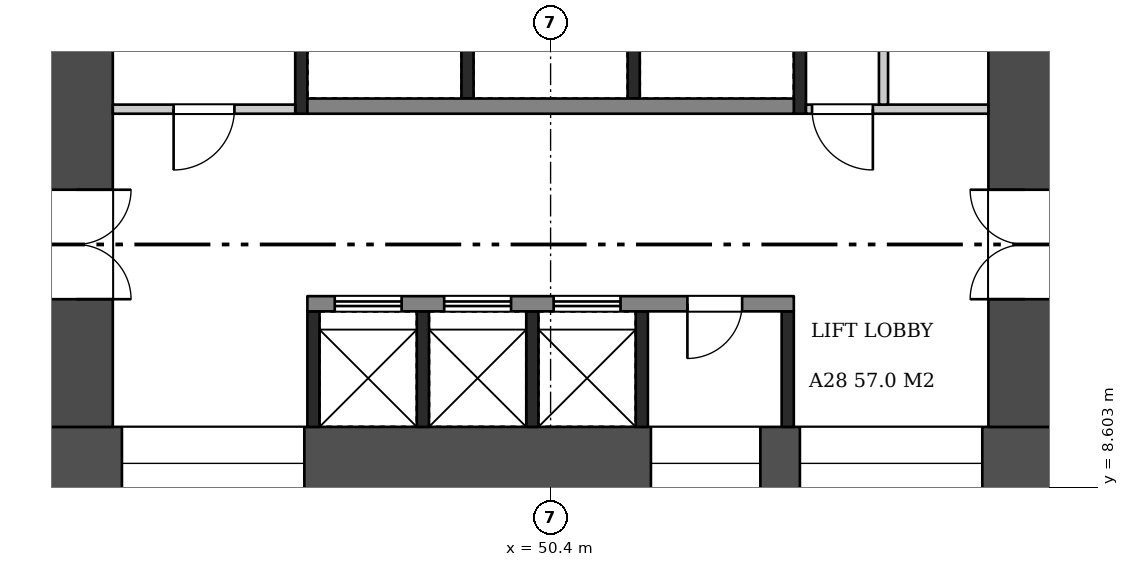
"""IFC4 building model, lengths in metres.
Left out: names, types, materials, properties, quantities, classifications, styles, units other than length and angle.
Written with IfcOpenShell. Run it as: python <this file> out.ifc"""

import sys

from ifc_helpers import new_model, si_unit, direction, frame, frame_2d, origin, place, context, subcontext, project, spatial, rectangle, extrude, element, fill, save


model = new_model("IFC4")
c1 = context("Model", 3, precision=1e-05, world=origin(), true_north=direction((0.0, 1.0)))
c2 = subcontext(c1, "Body", "Model", "MODEL_VIEW")
j1 = project(units=[si_unit("LENGTHUNIT", "METRE"), si_unit("PLANEANGLEUNIT", "RADIAN")], contexts=[c1])
p1 = place(None, origin())
s1 = spatial("IfcSite", under=j1, at=p1, CompositionType="ELEMENT")
p2 = place(p1, origin())
s2 = spatial("IfcBuilding", under=s1, at=p2, CompositionType="ELEMENT")
p3 = place(p2, frame((0.0, 0.0, 112.7)))
s3 = spatial("IfcBuildingStorey", under=s2, at=p3, CompositionType="ELEMENT", Elevation=112.7)
p4 = place(p3, frame((42.0, 9.0, 0.0), z_axis=(0.0, 0.0, 1.0), x_axis=(1.0, 0.0, 0.0)))
e1 = element("IfcWall", 1, at=p4, inside=s3, PredefinedType="SHEAR", context=c2, shape_type="SweptSolid", body=[
    extrude(rectangle(XDim=16.8, YDim=1.2, at=frame_2d((8.4, 0.0))), origin(), (0.0, 0.0, 1.0), 3.22),
])
p5 = place(p4, frame((1.35, 0.0, 0.6)))
e2 = element("IfcOpeningElement", 2, at=p5, cuts=e1, PredefinedType="OPENING", context=c2, shape_type="SweptSolid", body=[
    extrude(rectangle(XDim=3.0, YDim=2.1, at=frame_2d((1.5, 1.05))), frame((0.0, 0.61, 0.0), z_axis=(0.0, -1.0, 0.0), x_axis=(1.0, 0.0, 0.0)), (0.0, 0.0, 1.0), 1.22),
])
p6 = place(p4, frame((10.05, 0.0, 1.6)))
e3 = element("IfcOpeningElement", 3, at=p6, cuts=e1, PredefinedType="OPENING", context=c2, shape_type="SweptSolid", body=[
    extrude(rectangle(XDim=1.8, YDim=1.2, at=frame_2d((0.9, 0.6))), frame((0.0, 0.61, 0.0), z_axis=(0.0, -1.0, 0.0), x_axis=(1.0, 0.0, 0.0)), (0.0, 0.0, 1.0), 1.22),
])
p7 = place(p4, frame((12.5, 0.0, 0.6)))
e4 = element("IfcOpeningElement", 4, at=p7, cuts=e1, PredefinedType="OPENING", context=c2, shape_type="SweptSolid", body=[
    extrude(rectangle(XDim=3.0, YDim=2.1, at=frame_2d((1.5, 1.05))), frame((0.0, 0.61, 0.0), z_axis=(0.0, -1.0, 0.0), x_axis=(1.0, 0.0, 0.0)), (0.0, 0.0, 1.0), 1.22),
])
p8 = place(p3, frame((42.6, 9.6, 0.0), z_axis=(0.0, 0.0, 1.0), x_axis=(0.0, 1.0, 0.0)))
e5 = element("IfcWall", 5, at=p8, inside=s3, PredefinedType="SHEAR", context=c2, shape_type="SweptSolid", body=[
    extrude(rectangle(XDim=14.4, YDim=1.2, at=frame_2d((7.2, 0.0))), origin(), (0.0, 0.0, 1.0), 3.22),
])
p9 = place(p8, frame((2.1, 0.0, 0.0)))
e6 = element("IfcOpeningElement", 6, at=p9, cuts=e5, PredefinedType="OPENING", context=c2, shape_type="SweptSolid", body=[
    extrude(rectangle(XDim=1.8, YDim=2.1, at=frame_2d((0.9, 1.05))), frame((0.0, 0.61, 0.0), z_axis=(0.0, -1.0, 0.0), x_axis=(1.0, 0.0, 0.0)), (0.0, 0.0, 1.0), 1.22),
])
p10 = place(p3, frame((58.2, 9.6, 0.0), z_axis=(0.0, 0.0, 1.0), x_axis=(0.0, 1.0, 0.0)))
e7 = element("IfcWall", 7, at=p10, inside=s3, PredefinedType="SHEAR", context=c2, shape_type="SweptSolid", body=[
    extrude(rectangle(XDim=14.4, YDim=1.2, at=frame_2d((7.2, 0.0))), origin(), (0.0, 0.0, 1.0), 3.22),
])
p11 = place(p10, frame((2.1, 0.0, 0.0)))
e8 = element("IfcOpeningElement", 8, at=p11, cuts=e7, PredefinedType="OPENING", context=c2, shape_type="SweptSolid", body=[
    extrude(rectangle(XDim=1.8, YDim=2.1, at=frame_2d((0.9, 1.05))), frame((0.0, 0.61, 0.0), z_axis=(0.0, -1.0, 0.0), x_axis=(1.0, 0.0, 0.0)), (0.0, 0.0, 1.0), 1.22),
])
for number, where, z_axis, x_axis in (
    (9, (46.5, 9.6, 0.0), (0.0, 0.0, 1.0), (0.0, 1.0, 0.0)),
    (10, (48.3, 9.6, 0.0), (0.0, 0.0, 1.0), (0.0, 1.0, 0.0)),
    (11, (50.1, 9.6, 0.0), (0.0, 0.0, 1.0), (0.0, 1.0, 0.0)),
    (12, (51.9, 9.6, 0.0), (0.0, 0.0, 1.0), (0.0, 1.0, 0.0)),
    (13, (54.3, 9.6, 0.0), (0.0, 0.0, 1.0), (0.0, 1.0, 0.0)),
):
    element("IfcWall", number, at=place(p3, frame(where, z_axis=z_axis, x_axis=x_axis)), inside=s3, PredefinedType="SHEAR", context=c2, shape_type="SweptSolid", body=[
        extrude(rectangle(XDim=1.9, YDim=0.2, at=frame_2d((0.95, 0.0))), origin(), (0.0, 0.0, 1.0), 3.22),
    ])
p12 = place(p3, frame((46.4, 11.625, 0.0), z_axis=(0.0, 0.0, 1.0), x_axis=(1.0, 0.0, 0.0)))
e14 = element("IfcWall", 14, at=p12, inside=s3, PredefinedType="SHEAR", context=c2, shape_type="SweptSolid", body=[
    extrude(rectangle(XDim=8.0, YDim=0.25, at=frame_2d((4.0, 0.0))), origin(), (0.0, 0.0, 1.0), 3.22),
])
p13 = place(p12, frame((0.45, 0.0, 0.0)))
e15 = element("IfcOpeningElement", 15, at=p13, cuts=e14, PredefinedType="OPENING", context=c2, shape_type="SweptSolid", body=[
    extrude(rectangle(XDim=1.1, YDim=2.1, at=frame_2d((0.55, 1.05))), frame((0.0, 0.135, 0.0), z_axis=(0.0, -1.0, 0.0), x_axis=(1.0, 0.0, 0.0)), (0.0, 0.0, 1.0), 0.27),
])
p14 = place(p12, frame((2.25, 0.0, 0.0)))
e16 = element("IfcOpeningElement", 16, at=p14, cuts=e14, PredefinedType="OPENING", context=c2, shape_type="SweptSolid", body=[
    extrude(rectangle(XDim=1.1, YDim=2.1, at=frame_2d((0.55, 1.05))), frame((0.0, 0.135, 0.0), z_axis=(0.0, -1.0, 0.0), x_axis=(1.0, 0.0, 0.0)), (0.0, 0.0, 1.0), 0.27),
])
p15 = place(p12, frame((4.05, 0.0, 0.0)))
e17 = element("IfcOpeningElement", 17, at=p15, cuts=e14, PredefinedType="OPENING", context=c2, shape_type="SweptSolid", body=[
    extrude(rectangle(XDim=1.1, YDim=2.1, at=frame_2d((0.55, 1.05))), frame((0.0, 0.135, 0.0), z_axis=(0.0, -1.0, 0.0), x_axis=(1.0, 0.0, 0.0)), (0.0, 0.0, 1.0), 0.27),
])
p16 = place(p12, frame((6.25, 0.0, 0.0)))
e18 = element("IfcOpeningElement", 18, at=p16, cuts=e14, PredefinedType="OPENING", context=c2, shape_type="SweptSolid", body=[
    extrude(rectangle(XDim=0.9, YDim=2.1, at=frame_2d((0.45, 1.05))), frame((0.0, 0.135, 0.0), z_axis=(0.0, -1.0, 0.0), x_axis=(1.0, 0.0, 0.0)), (0.0, 0.0, 1.0), 0.27),
])
for number, where, z_axis, x_axis in (
    (19, (49.033, 15.0, 0.0), (0.0, 0.0, 1.0), (0.0, 1.0, 0.0)),
    (20, (51.767, 15.0, 0.0), (0.0, 0.0, 1.0), (0.0, 1.0, 0.0)),
):
    element("IfcWall", number, at=place(p3, frame(where, z_axis=z_axis, x_axis=x_axis)), inside=s3, PredefinedType="SHEAR", context=c2, shape_type="SweptSolid", body=[
        extrude(rectangle(XDim=1.9, YDim=0.2, at=frame_2d((0.95, 0.0))), origin(), (0.0, 0.0, 1.0), 3.22),
    ])
p17 = place(p3, frame((46.4, 14.875, 0.0), z_axis=(0.0, 0.0, 1.0), x_axis=(1.0, 0.0, 0.0)))
e21 = element("IfcWall", 21, at=p17, inside=s3, PredefinedType="SHEAR", context=c2, shape_type="SweptSolid", body=[
    extrude(rectangle(XDim=8.0, YDim=0.25, at=frame_2d((4.0, 0.0))), origin(), (0.0, 0.0, 1.0), 3.22),
])
p18 = place(p3, frame((46.3, 14.75, 0.0), z_axis=(0.0, 0.0, 1.0), x_axis=(0.0, 1.0, 0.0)))
e22 = element("IfcWall", 22, at=p18, inside=s3, PredefinedType="SHEAR", context=c2, shape_type="SweptSolid", body=[
    extrude(rectangle(XDim=2.4, YDim=0.2, at=frame_2d((1.2, 0.0))), origin(), (0.0, 0.0, 1.0), 3.22),
])
p19 = place(p3, frame((43.2, 14.825, 0.0), z_axis=(0.0, 0.0, 1.0), x_axis=(1.0, 0.0, 0.0)))
e23 = element("IfcWall", 23, at=p19, inside=s3, PredefinedType="PARTITIONING", context=c2, shape_type="SweptSolid", body=[
    extrude(rectangle(XDim=3.0, YDim=0.15, at=frame_2d((1.5, 0.0))), origin(), (0.0, 0.0, 1.0), 3.22),
])
p20 = place(p19, frame((1.0, 0.0, 0.0)))
e24 = element("IfcOpeningElement", 24, at=p20, cuts=e23, PredefinedType="OPENING", context=c2, shape_type="SweptSolid", body=[
    extrude(rectangle(XDim=1.0, YDim=2.1, at=frame_2d((0.5, 1.05))), frame((0.0, 0.085, 0.0), z_axis=(0.0, -1.0, 0.0), x_axis=(1.0, 0.0, 0.0)), (0.0, 0.0, 1.0), 0.17),
])
p21 = place(p3, frame((54.5, 14.75, 0.0), z_axis=(0.0, 0.0, 1.0), x_axis=(0.0, 1.0, 0.0)))
e25 = element("IfcWall", 25, at=p21, inside=s3, PredefinedType="SHEAR", context=c2, shape_type="SweptSolid", body=[
    extrude(rectangle(XDim=9.25, YDim=0.2, at=frame_2d((4.625, 0.0))), origin(), (0.0, 0.0, 1.0), 3.22),
])
p22 = place(p3, frame((54.6, 14.825, 0.0), z_axis=(0.0, 0.0, 1.0), x_axis=(1.0, 0.0, 0.0)))
e26 = element("IfcWall", 26, at=p22, inside=s3, PredefinedType="PARTITIONING", context=c2, shape_type="SweptSolid", body=[
    extrude(rectangle(XDim=3.0, YDim=0.15, at=frame_2d((1.5, 0.0))), origin(), (0.0, 0.0, 1.0), 3.22),
])
p23 = place(p22, frame((0.1, 0.0, 0.0)))
e27 = element("IfcOpeningElement", 27, at=p23, cuts=e26, PredefinedType="OPENING", context=c2, shape_type="SweptSolid", body=[
    extrude(rectangle(XDim=1.0, YDim=2.1, at=frame_2d((0.5, 1.05))), frame((0.0, 0.085, 0.0), z_axis=(0.0, -1.0, 0.0), x_axis=(1.0, 0.0, 0.0)), (0.0, 0.0, 1.0), 0.17),
])
p24 = place(p3, frame((55.875, 14.9, 0.0), z_axis=(0.0, 0.0, 1.0), x_axis=(0.0, 1.0, 0.0)))
e28 = element("IfcWall", 28, at=p24, inside=s3, PredefinedType="PARTITIONING", context=c2, shape_type="SweptSolid", body=[
    extrude(rectangle(XDim=9.1, YDim=0.15, at=frame_2d((4.55, 0.0))), origin(), (0.0, 0.0, 1.0), 3.22),
])
p25 = place(p24, frame((1.738, 0.0, 0.0)))
e29 = element("IfcOpeningElement", 29, at=p25, cuts=e28, PredefinedType="OPENING", context=c2, shape_type="SweptSolid", body=[
    extrude(rectangle(XDim=1.0, YDim=2.1, at=frame_2d((0.5, 1.05))), frame((0.0, 0.085, 0.0), z_axis=(0.0, -1.0, 0.0), x_axis=(1.0, 0.0, 0.0)), (0.0, 0.0, 1.0), 0.17),
])
p26 = place(p24, frame((6.413, 0.0, 0.0)))
e30 = element("IfcOpeningElement", 30, at=p26, cuts=e28, PredefinedType="OPENING", context=c2, shape_type="SweptSolid", body=[
    extrude(rectangle(XDim=0.9, YDim=2.1, at=frame_2d((0.45, 1.05))), frame((0.0, 0.085, 0.0), z_axis=(0.0, -1.0, 0.0), x_axis=(1.0, 0.0, 0.0)), (0.0, 0.0, 1.0), 0.17),
])
p27 = place(p9, frame((1.8, 0.0, 0.0), z_axis=(0.0, 0.0, 1.0), x_axis=(-1.0, 0.0, 0.0)))
e31 = element("IfcDoor", 31, at=p27, inside=s3, OperationType="DOUBLE_DOOR_SINGLE_SWING", PredefinedType="DOOR", context=c2, shape_type="SweptSolid", body=[
    extrude(rectangle(XDim=1.8, YDim=2.1, at=frame_2d((0.9, 1.05))), frame((0.0, 0.025, 0.0), z_axis=(0.0, -1.0, 0.0), x_axis=(1.0, 0.0, 0.0)), (0.0, 0.0, 1.0), 0.05),
])
fill(e6, e31)
p28 = place(p11, origin())
e32 = element("IfcDoor", 32, at=p28, inside=s3, OperationType="DOUBLE_DOOR_SINGLE_SWING", PredefinedType="DOOR", context=c2, shape_type="SweptSolid", body=[
    extrude(rectangle(XDim=1.8, YDim=2.1, at=frame_2d((0.9, 1.05))), frame((0.0, 0.025, 0.0), z_axis=(0.0, -1.0, 0.0), x_axis=(1.0, 0.0, 0.0)), (0.0, 0.0, 1.0), 0.05),
])
fill(e8, e32)
p29 = place(p13, origin())
e33 = element("IfcDoor", 33, at=p29, inside=s3, OperationType="DOUBLE_DOOR_SLIDING", PredefinedType="DOOR", context=c2, shape_type="SweptSolid", body=[
    extrude(rectangle(XDim=1.1, YDim=2.1, at=frame_2d((0.55, 1.05))), frame((0.0, 0.025, 0.0), z_axis=(0.0, -1.0, 0.0), x_axis=(1.0, 0.0, 0.0)), (0.0, 0.0, 1.0), 0.05),
])
fill(e15, e33)
p30 = place(p14, origin())
e34 = element("IfcDoor", 34, at=p30, inside=s3, OperationType="DOUBLE_DOOR_SLIDING", PredefinedType="DOOR", context=c2, shape_type="SweptSolid", body=[
    extrude(rectangle(XDim=1.1, YDim=2.1, at=frame_2d((0.55, 1.05))), frame((0.0, 0.025, 0.0), z_axis=(0.0, -1.0, 0.0), x_axis=(1.0, 0.0, 0.0)), (0.0, 0.0, 1.0), 0.05),
])
fill(e16, e34)
p31 = place(p15, origin())
e35 = element("IfcDoor", 35, at=p31, inside=s3, OperationType="DOUBLE_DOOR_SLIDING", PredefinedType="DOOR", context=c2, shape_type="SweptSolid", body=[
    extrude(rectangle(XDim=1.1, YDim=2.1, at=frame_2d((0.55, 1.05))), frame((0.0, 0.025, 0.0), z_axis=(0.0, -1.0, 0.0), x_axis=(1.0, 0.0, 0.0)), (0.0, 0.0, 1.0), 0.05),
])
fill(e17, e35)
p32 = place(p16, frame((0.9, 0.0, 0.0), z_axis=(0.0, 0.0, 1.0), x_axis=(-1.0, 0.0, 0.0)))
e36 = element("IfcDoor", 36, at=p32, inside=s3, OperationType="SINGLE_SWING_RIGHT", PredefinedType="DOOR", context=c2, shape_type="SweptSolid", body=[
    extrude(rectangle(XDim=0.9, YDim=2.1, at=frame_2d((0.45, 1.05))), frame((0.0, 0.025, 0.0), z_axis=(0.0, -1.0, 0.0), x_axis=(1.0, 0.0, 0.0)), (0.0, 0.0, 1.0), 0.05),
])
fill(e18, e36)
p33 = place(p20, frame((1.0, 0.0, 0.0), z_axis=(0.0, 0.0, 1.0), x_axis=(-1.0, 0.0, 0.0)))
e37 = element("IfcDoor", 37, at=p33, inside=s3, OperationType="SINGLE_SWING_RIGHT", PredefinedType="DOOR", context=c2, shape_type="SweptSolid", body=[
    extrude(rectangle(XDim=1.0, YDim=2.1, at=frame_2d((0.5, 1.05))), frame((0.0, 0.025, 0.0), z_axis=(0.0, -1.0, 0.0), x_axis=(1.0, 0.0, 0.0)), (0.0, 0.0, 1.0), 0.05),
])
fill(e24, e37)
p34 = place(p23, frame((1.0, 0.0, 0.0), z_axis=(0.0, 0.0, 1.0), x_axis=(-1.0, 0.0, 0.0)))
e38 = element("IfcDoor", 38, at=p34, inside=s3, OperationType="SINGLE_SWING_LEFT", PredefinedType="DOOR", context=c2, shape_type="SweptSolid", body=[
    extrude(rectangle(XDim=1.0, YDim=2.1, at=frame_2d((0.5, 1.05))), frame((0.0, 0.025, 0.0), z_axis=(0.0, -1.0, 0.0), x_axis=(1.0, 0.0, 0.0)), (0.0, 0.0, 1.0), 0.05),
])
fill(e27, e38)
p35 = place(p5, origin())
e39 = element("IfcWindow", 39, at=p35, inside=s3, PartitioningType="SINGLE_PANEL", PredefinedType="WINDOW", context=c2, shape_type="SweptSolid", body=[
    extrude(rectangle(XDim=3.0, YDim=2.1, at=frame_2d((1.5, 1.05))), frame((0.0, 0.03, 0.0), z_axis=(0.0, -1.0, 0.0), x_axis=(1.0, 0.0, 0.0)), (0.0, 0.0, 1.0), 0.06),
])
fill(e2, e39)
p36 = place(p6, origin())
e40 = element("IfcWindow", 40, at=p36, inside=s3, PartitioningType="SINGLE_PANEL", PredefinedType="WINDOW", context=c2, shape_type="SweptSolid", body=[
    extrude(rectangle(XDim=1.8, YDim=1.2, at=frame_2d((0.9, 0.6))), frame((0.0, 0.03, 0.0), z_axis=(0.0, -1.0, 0.0), x_axis=(1.0, 0.0, 0.0)), (0.0, 0.0, 1.0), 0.06),
])
fill(e3, e40)
p37 = place(p7, origin())
e41 = element("IfcWindow", 41, at=p37, inside=s3, PartitioningType="SINGLE_PANEL", PredefinedType="WINDOW", context=c2, shape_type="SweptSolid", body=[
    extrude(rectangle(XDim=3.0, YDim=2.1, at=frame_2d((1.5, 1.05))), frame((0.0, 0.03, 0.0), z_axis=(0.0, -1.0, 0.0), x_axis=(1.0, 0.0, 0.0)), (0.0, 0.0, 1.0), 0.06),
])
fill(e4, e41)
save(model, sys.argv[1])
